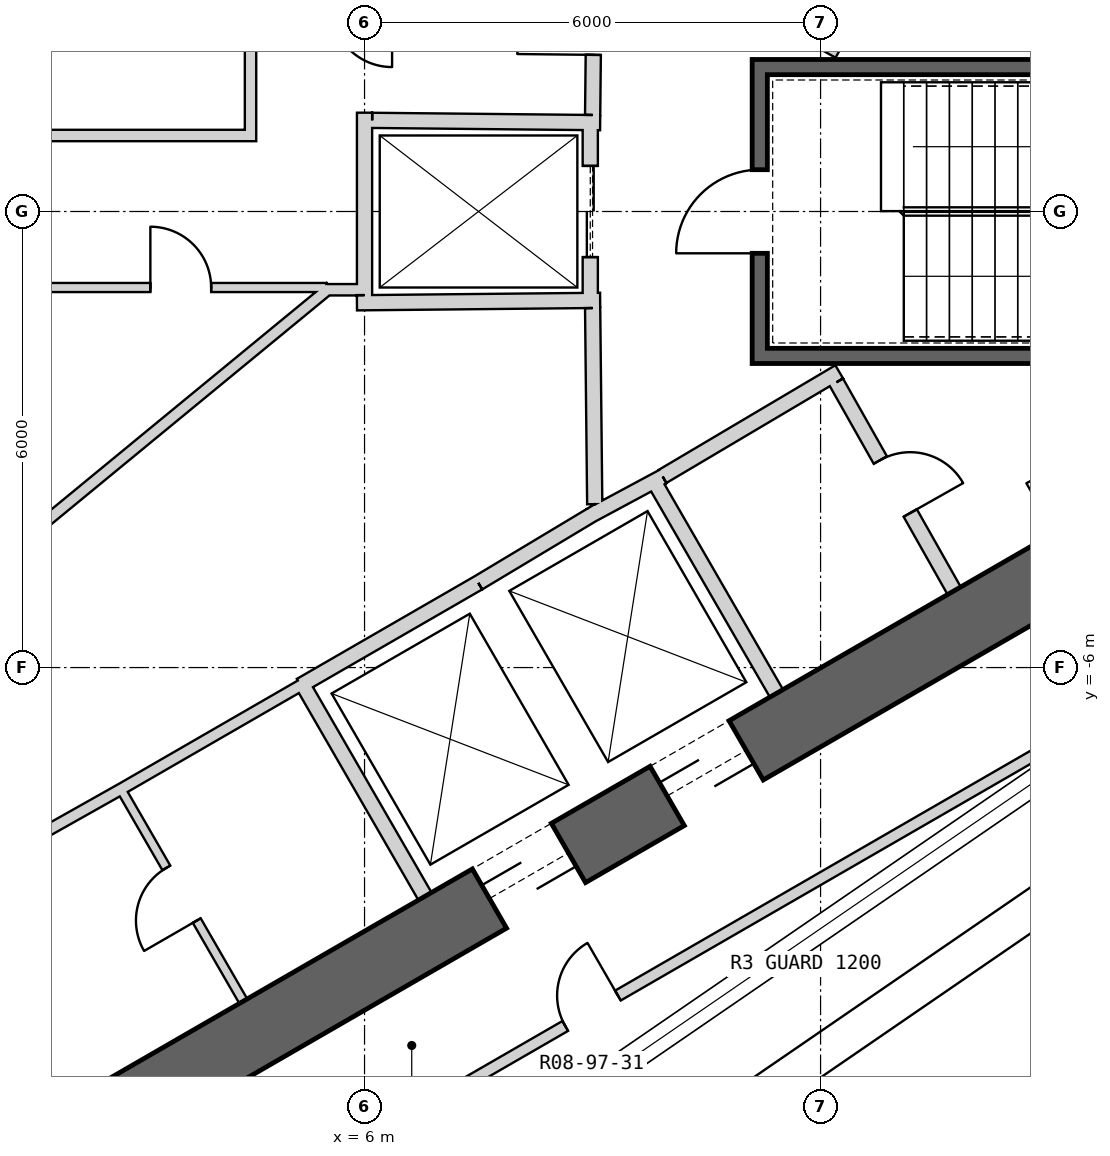
"""IFC4 building model, lengths in metres.
Left out: names, types, materials, properties, quantities, classifications, styles, units other than length and angle.
Written with IfcOpenShell. Run it as: python <this file> out.ifc"""

import sys

from ifc_helpers import new_model, si_unit, direction, frame, frame_2d, origin, place, context, subcontext, project, spatial, rectangle, extrude, element, fill, save


model = new_model("IFC4")
c1 = context("Model", 3, precision=1e-05, world=origin(), true_north=direction((0.0, 1.0)))
c2 = subcontext(c1, "Body", "Model", "MODEL_VIEW")
j1 = project(units=[si_unit("LENGTHUNIT", "METRE"), si_unit("PLANEANGLEUNIT", "RADIAN")], contexts=[c1])
p1 = place(None, origin())
s1 = spatial("IfcSite", under=j1, at=p1, CompositionType="ELEMENT")
p2 = place(p1, origin())
s2 = spatial("IfcBuilding", under=s1, at=p2, CompositionType="ELEMENT")
p3 = place(p2, frame((0.0, 0.0, 430.3)))
s3 = spatial("IfcBuildingStorey", under=s2, at=p3, CompositionType="ELEMENT", Elevation=430.3)
p4 = place(p3, frame((19.475, 2.208, 0.0), z_axis=(0.0, 0.0, 1.0), x_axis=(-0.866028369851, 0.499994862586, 0.0)))
e1 = element("IfcWall", 1, at=p4, inside=s3, PredefinedType="SHEAR", context=c2, shape_type="SweptSolid", body=[
    extrude(rectangle(XDim=31.523, YDim=0.9, at=frame_2d((15.762, 0.0))), origin(), (0.0, 0.0, 1.0), 5.0),
])
p5 = place(p4, frame((3.612, 0.0, 0.0)))
e2 = element("IfcOpeningElement", 2, at=p5, cuts=e1, PredefinedType="OPENING", context=c2, shape_type="SweptSolid", body=[
    extrude(rectangle(XDim=1.2, YDim=2.4, at=frame_2d((0.6, 1.2))), frame((0.0, 0.46, 0.0), z_axis=(0.0, -1.0, 0.0), x_axis=(1.0, 0.0, 0.0)), (0.0, 0.0, 1.0), 0.92),
])
p6 = place(p4, frame((26.712, 0.0, 0.0)))
e3 = element("IfcOpeningElement", 3, at=p6, cuts=e1, PredefinedType="OPENING", context=c2, shape_type="SweptSolid", body=[
    extrude(rectangle(XDim=1.2, YDim=2.4, at=frame_2d((0.6, 1.2))), frame((0.0, 0.46, 0.0), z_axis=(0.0, -1.0, 0.0), x_axis=(1.0, 0.0, 0.0)), (0.0, 0.0, 1.0), 0.92),
])
p7 = place(p3, frame((-7.825, -17.97, 0.0), z_axis=(0.0, 0.0, 1.0), x_axis=(0.866028369851, 0.499994862586, 0.0)))
e4 = element("IfcWall", 4, at=p7, inside=s3, PredefinedType="SHEAR", context=c2, shape_type="SweptSolid", body=[
    extrude(rectangle(XDim=31.523, YDim=0.9, at=frame_2d((15.762, 0.0))), origin(), (0.0, 0.0, 1.0), 5.0),
])
p8 = place(p7, frame((17.862, 0.0, 0.0)))
e5 = element("IfcOpeningElement", 5, at=p8, cuts=e4, PredefinedType="OPENING", context=c2, shape_type="SweptSolid", body=[
    extrude(rectangle(XDim=1.2, YDim=2.4, at=frame_2d((0.6, 1.2))), frame((0.0, 0.46, 0.0), z_axis=(0.0, -1.0, 0.0), x_axis=(1.0, 0.0, 0.0)), (0.0, 0.0, 1.0), 0.92),
])
p9 = place(p7, frame((20.562, 0.0, 0.0)))
e6 = element("IfcOpeningElement", 6, at=p9, cuts=e4, PredefinedType="OPENING", context=c2, shape_type="SweptSolid", body=[
    extrude(rectangle(XDim=1.2, YDim=2.4, at=frame_2d((0.6, 1.2))), frame((0.0, 0.46, 0.0), z_axis=(0.0, -1.0, 0.0), x_axis=(1.0, 0.0, 0.0)), (0.0, 0.0, 1.0), 0.92),
])
p10 = place(p7, frame((26.712, 0.0, 0.0)))
e7 = element("IfcOpeningElement", 7, at=p10, cuts=e4, PredefinedType="OPENING", context=c2, shape_type="SweptSolid", body=[
    extrude(rectangle(XDim=1.2, YDim=2.4, at=frame_2d((0.6, 1.2))), frame((0.0, 0.46, 0.0), z_axis=(0.0, -1.0, 0.0), x_axis=(1.0, 0.0, 0.0)), (0.0, 0.0, 1.0), 0.92),
])
p11 = place(p7, frame((3.612, 0.0, 0.0)))
e8 = element("IfcOpeningElement", 8, at=p11, cuts=e4, PredefinedType="OPENING", context=c2, shape_type="SweptSolid", body=[
    extrude(rectangle(XDim=1.2, YDim=2.4, at=frame_2d((0.6, 1.2))), frame((0.0, 0.46, 0.0), z_axis=(0.0, -1.0, 0.0), x_axis=(1.0, 0.0, 0.0)), (0.0, 0.0, 1.0), 0.92),
])
p12 = place(p3, frame((6.795, -9.01, 0.0), z_axis=(0.0, 0.0, 1.0), x_axis=(-0.499984717929, 0.866034226713, 0.0)))
e9 = element("IfcWall", 9, at=p12, inside=s3, PredefinedType="PLUMBINGWALL", context=c2, shape_type="SweptSolid", body=[
    extrude(rectangle(XDim=3.25, YDim=0.2, at=frame_2d((1.625, 0.0))), origin(), (0.0, 0.0, 1.0), 4.75),
])
p13 = place(p3, frame((5.159, -6.236, 0.0), z_axis=(0.0, 0.0, 1.0), x_axis=(0.866036505625, 0.499980770555, 0.0)))
e10 = element("IfcWall", 10, at=p13, inside=s3, PredefinedType="PLUMBINGWALL", context=c2, shape_type="SweptSolid", body=[
    extrude(rectangle(XDim=2.7, YDim=0.2, at=frame_2d((1.35, 0.0))), origin(), (0.0, 0.0, 1.0), 4.75),
])
p14 = place(p3, frame((9.795, -3.525, 0.0), z_axis=(0.0, 0.0, 1.0), x_axis=(0.499984717929, -0.866034226713, 0.0)))
e11 = element("IfcWall", 11, at=p14, inside=s3, PredefinedType="PLUMBINGWALL", context=c2, shape_type="SweptSolid", body=[
    extrude(rectangle(XDim=3.25, YDim=0.2, at=frame_2d((1.625, 0.0))), origin(), (0.0, 0.0, 1.0), 4.75),
])
p15 = place(p3, frame((8.974, -3.999, 0.0), z_axis=(0.0, 0.0, 1.0), x_axis=(0.880907015104, 0.473289373154, 0.0)))
e12 = element("IfcWall", 12, at=p15, inside=s3, PredefinedType="PLUMBINGWALL", context=c2, shape_type="SweptSolid", body=[
    extrude(rectangle(XDim=1.078, YDim=0.2, at=frame_2d((0.539, 0.0))), origin(), (0.0, 0.0, 1.0), 4.75),
])
p16 = place(p3, frame((7.497, -4.886, 0.0), z_axis=(0.0, 0.0, 1.0), x_axis=(0.857516281273, 0.51445682749, 0.0)))
e13 = element("IfcWall", 13, at=p16, inside=s3, PredefinedType="PLUMBINGWALL", context=c2, shape_type="SweptSolid", body=[
    extrude(rectangle(XDim=1.845, YDim=0.2, at=frame_2d((0.922, 0.0))), origin(), (0.0, 0.0, 1.0), 4.75),
])
p17 = place(p3, frame((19.2, 1.9, -0.25), z_axis=(0.0, 0.0, 1.0), x_axis=(-1.0, 0.0, 0.0)))
e14 = element("IfcWall", 14, at=p17, inside=s3, PredefinedType="SHEAR", context=c2, shape_type="SweptSolid", body=[
    extrude(rectangle(XDim=8.1, YDim=0.2, at=frame_2d((4.05, 0.0))), origin(), (0.0, 0.0, 1.0), 5.0),
])
p18 = place(p3, frame((11.1, -1.9, -0.25), z_axis=(0.0, 0.0, 1.0), x_axis=(1.0, 0.0, 0.0)))
e15 = element("IfcWall", 15, at=p18, inside=s3, PredefinedType="SHEAR", context=c2, shape_type="SweptSolid", body=[
    extrude(rectangle(XDim=7.9, YDim=0.2, at=frame_2d((3.95, 0.0))), origin(), (0.0, 0.0, 1.0), 5.0),
])
p19 = place(p3, frame((11.2, -1.8, -0.25), z_axis=(0.0, 0.0, 1.0), x_axis=(0.0, 1.0, 0.0)))
e16 = element("IfcWall", 16, at=p19, inside=s3, PredefinedType="SHEAR", context=c2, shape_type="SweptSolid", body=[
    extrude(rectangle(XDim=3.6, YDim=0.2, at=frame_2d((1.8, 0.0))), origin(), (0.0, 0.0, 1.0), 5.0),
])
p20 = place(p19, frame((1.25, 0.0, 0.25)))
e17 = element("IfcOpeningElement", 17, at=p20, cuts=e16, PredefinedType="OPENING", context=c2, shape_type="SweptSolid", body=[
    extrude(rectangle(XDim=1.1, YDim=2.1, at=frame_2d((0.55, 1.05))), frame((0.0, 0.11, 0.0), z_axis=(0.0, -1.0, 0.0), x_axis=(1.0, 0.0, 0.0)), (0.0, 0.0, 1.0), 0.22),
])
p21 = place(p3, frame((8.97, 1.2, 0.0), z_axis=(0.0, 0.0, 1.0), x_axis=(0.0, -1.0, 0.0)))
e18 = element("IfcWall", 18, at=p21, inside=s3, PredefinedType="PLUMBINGWALL", context=c2, shape_type="SweptSolid", body=[
    extrude(rectangle(XDim=2.4, YDim=0.2, at=frame_2d((1.2, 0.0))), origin(), (0.0, 0.0, 1.0), 4.75),
])
p22 = place(p21, frame((0.6, 0.0, 0.0)))
e19 = element("IfcOpeningElement", 19, at=p22, cuts=e18, PredefinedType="OPENING", context=c2, shape_type="SweptSolid", body=[
    extrude(rectangle(XDim=1.2, YDim=2.4, at=frame_2d((0.6, 1.2))), frame((0.0, 0.11, 0.0), z_axis=(0.0, -1.0, 0.0), x_axis=(1.0, 0.0, 0.0)), (0.0, 0.0, 1.0), 0.22),
])
p23 = place(p3, frame((9.1, -1.169, 0.0), z_axis=(0.0, 0.0, 1.0), x_axis=(-0.999950064753, -0.009993397809, 0.0)))
e20 = element("IfcWall", 20, at=p23, inside=s3, PredefinedType="PLUMBINGWALL", context=c2, shape_type="SweptSolid", body=[
    extrude(rectangle(XDim=3.2, YDim=0.2, at=frame_2d((1.6, 0.0))), origin(), (0.0, 0.0, 1.0), 4.75),
])
p24 = place(p3, frame((6.0, -1.1, 0.0), z_axis=(0.0, 0.0, 1.0), x_axis=(0.0, 1.0, 0.0)))
e21 = element("IfcWall", 21, at=p24, inside=s3, PredefinedType="PLUMBINGWALL", context=c2, shape_type="SweptSolid", body=[
    extrude(rectangle(XDim=2.4, YDim=0.2, at=frame_2d((1.2, 0.0))), origin(), (0.0, 0.0, 1.0), 4.75),
])
p25 = place(p3, frame((9.1, 1.169, 0.0), z_axis=(0.0, 0.0, 1.0), x_axis=(-0.99994990606, 0.010009264196, 0.0)))
e22 = element("IfcWall", 22, at=p25, inside=s3, PredefinedType="PLUMBINGWALL", context=c2, shape_type="SweptSolid", body=[
    extrude(rectangle(XDim=3.0, YDim=0.2, at=frame_2d((1.5, 0.0))), origin(), (0.0, 0.0, 1.0), 4.75),
])
p26 = place(p3, frame((12.11, 2.073, 0.0), z_axis=(0.0, 0.0, 1.0), x_axis=(0.49196600604, 0.870614408852, 0.0)))
e23 = element("IfcWall", 23, at=p26, inside=s3, PredefinedType="PARTITIONING", context=c2, shape_type="SweptSolid", body=[
    extrude(rectangle(XDim=3.35, YDim=0.2, at=frame_2d((1.675, 0.0))), origin(), (0.0, 0.0, 1.0), 4.75),
])
p27 = place(p3, frame((4.405, -10.389, 0.0), z_axis=(0.0, 0.0, 1.0), x_axis=(-0.500017246033, 0.866015446554, 0.0)))
e24 = element("IfcWall", 24, at=p27, inside=s3, PredefinedType="PARTITIONING", context=c2, shape_type="SweptSolid", body=[
    extrude(rectangle(XDim=3.25, YDim=0.12, at=frame_2d((1.625, 0.0))), origin(), (0.0, 0.0, 1.0), 4.75),
])
p28 = place(p27, frame((1.225, 0.0, 0.0)))
e25 = element("IfcOpeningElement", 25, at=p28, cuts=e24, PredefinedType="OPENING", context=c2, shape_type="SweptSolid", body=[
    extrude(rectangle(XDim=0.8, YDim=2.1, at=frame_2d((0.4, 1.05))), frame((0.0, 0.07, 0.0), z_axis=(0.0, -1.0, 0.0), x_axis=(1.0, 0.0, 0.0)), (0.0, 0.0, 1.0), 0.14),
])
p29 = place(p3, frame((0.42, -8.938, 0.0), z_axis=(0.0, 0.0, 1.0), x_axis=(0.871409832999, 0.490555708306, 0.0)))
e26 = element("IfcWall", 26, at=p29, inside=s3, PredefinedType="PLUMBINGWALL", context=c2, shape_type="SweptSolid", body=[
    extrude(rectangle(XDim=2.755, YDim=0.15, at=frame_2d((1.377, 0.0))), origin(), (0.0, 0.0, 1.0), 4.75),
])
p30 = place(p3, frame((2.821, -7.586, 0.0), z_axis=(0.0, 0.0, 1.0), x_axis=(0.866019956843, 0.50000943426, 0.0)))
e27 = element("IfcWall", 27, at=p30, inside=s3, PredefinedType="PLUMBINGWALL", context=c2, shape_type="SweptSolid", body=[
    extrude(rectangle(XDim=2.7, YDim=0.15, at=frame_2d((1.35, 0.0))), origin(), (0.0, 0.0, 1.0), 4.75),
])
p31 = place(p3, frame((12.245, -2.109, 0.0), z_axis=(0.0, 0.0, 1.0), x_axis=(-0.860414880418, -0.509594185166, 0.0)))
e28 = element("IfcWall", 28, at=p31, inside=s3, PredefinedType="PARTITIONING", context=c2, shape_type="SweptSolid", body=[
    extrude(rectangle(XDim=2.7, YDim=0.2, at=frame_2d((1.35, 0.0))), origin(), (0.0, 0.0, 1.0), 4.75),
])
p32 = place(p3, frame((13.758, -4.99, 0.0), z_axis=(0.0, 0.0, 1.0), x_axis=(-0.491993409184, 0.87059892334, 0.0)))
e29 = element("IfcWall", 29, at=p32, inside=s3, PredefinedType="PARTITIONING", context=c2, shape_type="SweptSolid", body=[
    extrude(rectangle(XDim=3.15, YDim=0.2, at=frame_2d((1.575, 0.0))), origin(), (0.0, 0.0, 1.0), 4.75),
])
p33 = place(p32, frame((1.175, 0.0, 0.0)))
e30 = element("IfcOpeningElement", 30, at=p33, cuts=e29, PredefinedType="OPENING", context=c2, shape_type="SweptSolid", body=[
    extrude(rectangle(XDim=0.8, YDim=2.1, at=frame_2d((0.4, 1.05))), frame((0.0, 0.11, 0.0), z_axis=(0.0, -1.0, 0.0), x_axis=(1.0, 0.0, 0.0)), (0.0, 0.0, 1.0), 0.22),
])
p34 = place(p3, frame((9.029, -3.851, 0.0), z_axis=(0.0, 0.0, 1.0), x_axis=(-0.010784614026, 0.999941844359, 0.0)))
e31 = element("IfcWall", 31, at=p34, inside=s3, PredefinedType="PARTITIONING", context=c2, shape_type="SweptSolid", body=[
    extrude(rectangle(XDim=2.581, YDim=0.2, at=frame_2d((1.291, 0.0))), origin(), (0.0, 0.0, 1.0), 4.75),
])
p35 = place(p3, frame((9.001, 1.27, 0.0), z_axis=(0.0, 0.0, 1.0), x_axis=(0.010780534828, 0.999941888346, 0.0)))
e32 = element("IfcWall", 32, at=p35, inside=s3, PredefinedType="PARTITIONING", context=c2, shape_type="SweptSolid", body=[
    extrude(rectangle(XDim=2.582, YDim=0.2, at=frame_2d((1.291, 0.0))), origin(), (0.0, 0.0, 1.0), 4.75),
])
p36 = place(p35, frame((0.791, 0.0, 0.0)))
e33 = element("IfcOpeningElement", 33, at=p36, cuts=e32, PredefinedType="OPENING", context=c2, shape_type="SweptSolid", body=[
    extrude(rectangle(XDim=1.0, YDim=2.1, at=frame_2d((0.5, 1.05))), frame((0.0, 0.11, 0.0), z_axis=(0.0, -1.0, 0.0), x_axis=(1.0, 0.0, 0.0)), (0.0, 0.0, 1.0), 0.22),
])
p37 = place(p3, frame((5.548, -1.0, 0.0), z_axis=(0.0, 0.0, 1.0), x_axis=(-0.772345431507, -0.635202750648, 0.0)))
e34 = element("IfcWall", 34, at=p37, inside=s3, PredefinedType="PLUMBINGWALL", context=c2, shape_type="SweptSolid", body=[
    extrude(rectangle(XDim=7.415, YDim=0.15, at=frame_2d((3.707, 0.0))), origin(), (0.0, 0.0, 1.0), 4.75),
])
p38 = place(p3, frame((5.9, -1.03, 0.0), z_axis=(0.0, 0.0, 1.0), x_axis=(-1.0, 0.0, 0.0)))
e35 = element("IfcWall", 35, at=p38, inside=s3, PredefinedType="PLUMBINGWALL", context=c2, shape_type="SweptSolid", body=[
    extrude(rectangle(XDim=0.4, YDim=0.15, at=frame_2d((0.2, 0.0))), origin(), (0.0, 0.0, 1.0), 4.75),
])
p39 = place(p3, frame((5.5, -1.0, 0.0), z_axis=(0.0, 0.0, 1.0), x_axis=(-1.0, 0.0, 0.0)))
e36 = element("IfcWall", 36, at=p39, inside=s3, PredefinedType="PARTITIONING", context=c2, shape_type="SweptSolid", body=[
    extrude(rectangle(XDim=3.836, YDim=0.12, at=frame_2d((1.918, 0.0))), origin(), (0.0, 0.0, 1.0), 4.75),
])
p40 = place(p39, frame((1.518, 0.0, 0.0)))
e37 = element("IfcOpeningElement", 37, at=p40, cuts=e36, PredefinedType="OPENING", context=c2, shape_type="SweptSolid", body=[
    extrude(rectangle(XDim=0.8, YDim=2.1, at=frame_2d((0.4, 1.05))), frame((0.0, 0.07, 0.0), z_axis=(0.0, -1.0, 0.0), x_axis=(1.0, 0.0, 0.0)), (0.0, 0.0, 1.0), 0.14),
])
p41 = place(p3, frame((4.5, 0.925, 0.0), z_axis=(0.0, 0.0, 1.0), x_axis=(0.0, 1.0, 0.0)))
e38 = element("IfcWall", 38, at=p41, inside=s3, PredefinedType="PLUMBINGWALL", context=c2, shape_type="SweptSolid", body=[
    extrude(rectangle(XDim=1.7, YDim=0.15, at=frame_2d((0.85, 0.0))), origin(), (0.0, 0.0, 1.0), 4.75),
])
p42 = place(p3, frame((1.516, 1.0, 0.0), z_axis=(0.0, 0.0, 1.0), x_axis=(1.0, 0.0, 0.0)))
e39 = element("IfcWall", 39, at=p42, inside=s3, PredefinedType="PLUMBINGWALL", context=c2, shape_type="SweptSolid", body=[
    extrude(rectangle(XDim=2.909, YDim=0.15, at=frame_2d((1.455, 0.0))), origin(), (0.0, 0.0, 1.0), 4.75),
])
p43 = place(p3, frame((6.698, -11.837, 0.0), z_axis=(0.0, 0.0, 1.0), x_axis=(0.866022938386, 0.500004270171, 0.0)))
e40 = element("IfcWall", 40, at=p43, inside=s3, PredefinedType="PLUMBINGWALL", context=c2, shape_type="SweptSolid", body=[
    extrude(rectangle(XDim=16.148, YDim=0.15, at=frame_2d((8.074, 0.0))), origin(), (0.0, 0.0, 1.0), 4.75),
])
p44 = place(p43, frame((2.243, 0.0, 0.0)))
e41 = element("IfcOpeningElement", 41, at=p44, cuts=e40, PredefinedType="OPENING", context=c2, shape_type="SweptSolid", body=[
    extrude(rectangle(XDim=0.8, YDim=2.1, at=frame_2d((0.4, 1.05))), frame((0.0, 0.085, 0.0), z_axis=(0.0, -1.0, 0.0), x_axis=(1.0, 0.0, 0.0)), (0.0, 0.0, 1.0), 0.17),
])
p45 = place(p20, origin())
e42 = element("IfcDoor", 42, at=p45, inside=s3, OperationType="SINGLE_SWING_LEFT", PredefinedType="USERDEFINED", context=c2, shape_type="SweptSolid", body=[
    extrude(rectangle(XDim=1.1, YDim=2.1, at=frame_2d((0.55, 1.05))), frame((0.0, 0.025, 0.0), z_axis=(0.0, -1.0, 0.0), x_axis=(1.0, 0.0, 0.0)), (0.0, 0.0, 1.0), 0.05),
])
fill(e17, e42)
p46 = place(p36, origin())
e43 = element("IfcDoor", 43, at=p46, inside=s3, OperationType="SINGLE_SWING_LEFT", PredefinedType="USERDEFINED", context=c2, shape_type="SweptSolid", body=[
    extrude(rectangle(XDim=1.0, YDim=2.1, at=frame_2d((0.5, 1.05))), frame((0.0, 0.025, 0.0), z_axis=(0.0, -1.0, 0.0), x_axis=(1.0, 0.0, 0.0)), (0.0, 0.0, 1.0), 0.05),
])
fill(e33, e43)
p47 = place(p22, origin())
e44 = element("IfcDoor", 44, at=p47, inside=s3, OperationType="SLIDING_TO_LEFT", PredefinedType="USERDEFINED", context=c2, shape_type="SweptSolid", body=[
    extrude(rectangle(XDim=1.2, YDim=2.4, at=frame_2d((0.6, 1.2))), frame((0.0, 0.025, 0.0), z_axis=(0.0, -1.0, 0.0), x_axis=(1.0, 0.0, 0.0)), (0.0, 0.0, 1.0), 0.05),
])
fill(e19, e44)
p48 = place(p40, origin())
e45 = element("IfcDoor", 45, at=p48, inside=s3, OperationType="SINGLE_SWING_RIGHT", PredefinedType="USERDEFINED", context=c2, shape_type="SweptSolid", body=[
    extrude(rectangle(XDim=0.8, YDim=2.1, at=frame_2d((0.4, 1.05))), frame((0.0, 0.025, 0.0), z_axis=(0.0, -1.0, 0.0), x_axis=(1.0, 0.0, 0.0)), (0.0, 0.0, 1.0), 0.05),
])
fill(e37, e45)
p49 = place(p28, origin())
e46 = element("IfcDoor", 46, at=p49, inside=s3, OperationType="SINGLE_SWING_LEFT", PredefinedType="USERDEFINED", context=c2, shape_type="SweptSolid", body=[
    extrude(rectangle(XDim=0.8, YDim=2.1, at=frame_2d((0.4, 1.05))), frame((0.0, 0.025, 0.0), z_axis=(0.0, -1.0, 0.0), x_axis=(1.0, 0.0, 0.0)), (0.0, 0.0, 1.0), 0.05),
])
fill(e25, e46)
p50 = place(p33, origin())
e47 = element("IfcDoor", 47, at=p50, inside=s3, OperationType="SINGLE_SWING_LEFT", PredefinedType="USERDEFINED", context=c2, shape_type="SweptSolid", body=[
    extrude(rectangle(XDim=0.8, YDim=2.1, at=frame_2d((0.4, 1.05))), frame((0.0, 0.025, 0.0), z_axis=(0.0, -1.0, 0.0), x_axis=(1.0, 0.0, 0.0)), (0.0, 0.0, 1.0), 0.05),
])
fill(e30, e47)
p51 = place(p44, origin())
e48 = element("IfcDoor", 48, at=p51, inside=s3, OperationType="SINGLE_SWING_RIGHT", PredefinedType="USERDEFINED", context=c2, shape_type="SweptSolid", body=[
    extrude(rectangle(XDim=0.8, YDim=2.1, at=frame_2d((0.4, 1.05))), frame((0.0, 0.025, 0.0), z_axis=(0.0, -1.0, 0.0), x_axis=(1.0, 0.0, 0.0)), (0.0, 0.0, 1.0), 0.05),
])
fill(e41, e48)
p52 = place(p8, origin())
e49 = element("IfcDoor", 49, at=p52, inside=s3, OperationType="SLIDING_TO_LEFT", PredefinedType="USERDEFINED", context=c2, shape_type="SweptSolid", body=[
    extrude(rectangle(XDim=1.2, YDim=2.4, at=frame_2d((0.6, 1.2))), frame((0.0, 0.025, 0.0), z_axis=(0.0, -1.0, 0.0), x_axis=(1.0, 0.0, 0.0)), (0.0, 0.0, 1.0), 0.05),
])
fill(e5, e49)
p53 = place(p9, origin())
e50 = element("IfcDoor", 50, at=p53, inside=s3, OperationType="SLIDING_TO_LEFT", PredefinedType="USERDEFINED", context=c2, shape_type="SweptSolid", body=[
    extrude(rectangle(XDim=1.2, YDim=2.4, at=frame_2d((0.6, 1.2))), frame((0.0, 0.025, 0.0), z_axis=(0.0, -1.0, 0.0), x_axis=(1.0, 0.0, 0.0)), (0.0, 0.0, 1.0), 0.05),
])
fill(e6, e50)
save(model, sys.argv[1])
